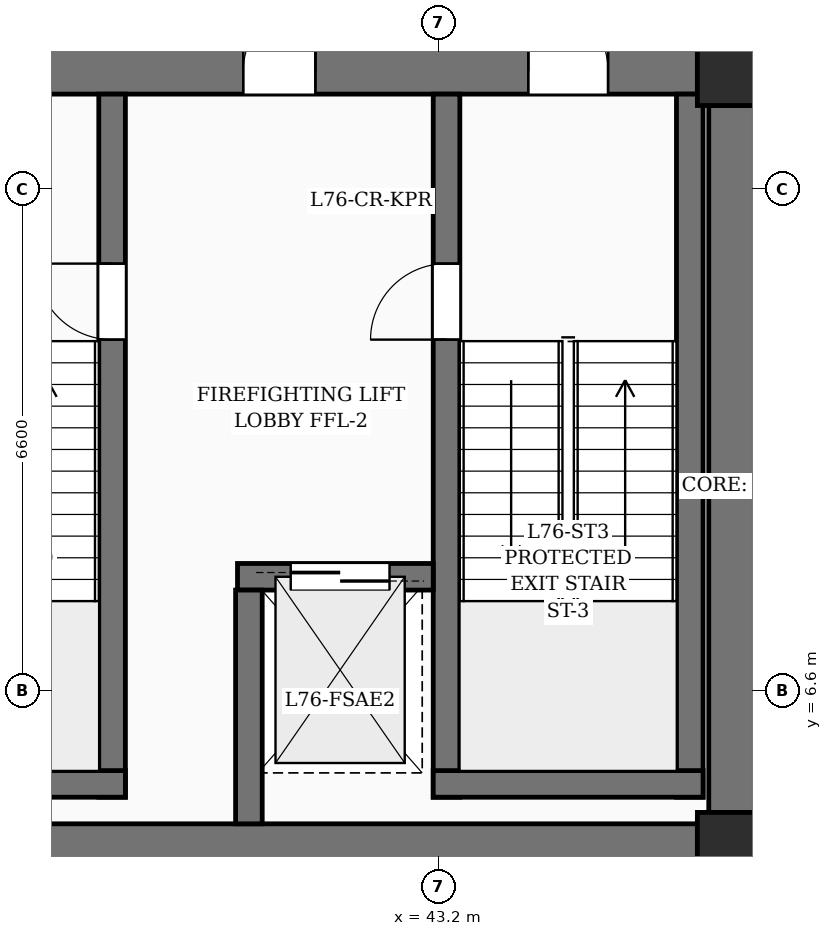
"""IFC4 building model, lengths in metres.
Left out: names, types, materials, properties, quantities, classifications, styles, units other than length and angle.
Written with IfcOpenShell. Run it as: python <this file> out.ifc"""

import sys

from ifc_helpers import new_model, si_unit, direction, frame, frame_2d, origin, origin_2d, place, context, subcontext, project, spatial, rectangle, extrude, element, fill, save


model = new_model("IFC4")
c1 = context("Model", 3, precision=1e-05, world=origin(), true_north=direction((0.0, 1.0)))
c2 = subcontext(c1, "Body", "Model", "MODEL_VIEW")
j1 = project(units=[si_unit("LENGTHUNIT", "METRE"), si_unit("PLANEANGLEUNIT", "RADIAN")], contexts=[c1])
p1 = place(None, origin())
s1 = spatial("IfcSite", under=j1, at=p1, CompositionType="ELEMENT")
p2 = place(p1, origin())
s2 = spatial("IfcBuilding", under=s1, at=p2, CompositionType="ELEMENT")
p3 = place(p2, frame((0.0, 0.0, 294.0)))
s3 = spatial("IfcBuildingStorey", under=s2, at=p3, CompositionType="ELEMENT", Elevation=294.0)
for number, where, z_axis, x_axis in (
    (1, (47.05, 4.55, 0.0), (0.0, 0.0, 1.0), (1.0, 0.0, 0.0)),
    (2, (47.05, 14.75, 0.0), (0.0, 0.0, 1.0), (1.0, 0.0, 0.0)),
):
    element("IfcColumn", number, at=place(p3, frame(where, z_axis=z_axis, x_axis=x_axis)), inside=s3, PredefinedType="COLUMN", context=c2, shape_type="SweptSolid", body=[
        extrude(rectangle(XDim=0.9, YDim=0.9, at=origin_2d()), origin(), (0.0, 0.0, 1.0), 4.5),
    ])
p4 = place(p3, frame((35.6, 4.55, 0.0), z_axis=(0.0, 0.0, 1.0), x_axis=(1.0, 0.0, 0.0)))
e3 = element("IfcWall", 3, at=p4, inside=s3, PredefinedType="SHEAR", context=c2, shape_type="SweptSolid", body=[
    extrude(rectangle(XDim=11.0, YDim=0.6, at=frame_2d((5.5, 0.0))), origin(), (0.0, 0.0, 1.0), 4.5),
])
p5 = place(p3, frame((35.6, 14.75, 0.0), z_axis=(0.0, 0.0, 1.0), x_axis=(1.0, 0.0, 0.0)))
e4 = element("IfcWall", 4, at=p5, inside=s3, PredefinedType="SHEAR", context=c2, shape_type="SweptSolid", body=[
    extrude(rectangle(XDim=11.0, YDim=0.6, at=frame_2d((5.5, 0.0))), origin(), (0.0, 0.0, 1.0), 4.5),
])
p6 = place(p5, frame((1.175, 0.0, 0.0)))
e5 = element("IfcOpeningElement", 5, at=p6, cuts=e4, PredefinedType="OPENING", context=c2, shape_type="SweptSolid", body=[
    extrude(rectangle(XDim=1.05, YDim=2.15, at=frame_2d((0.525, 1.075))), frame((0.0, 0.31, 0.0), z_axis=(0.0, -1.0, 0.0), x_axis=(1.0, 0.0, 0.0)), (0.0, 0.0, 1.0), 0.62),
])
p7 = place(p5, frame((8.775, 0.0, 0.0)))
e6 = element("IfcOpeningElement", 6, at=p7, cuts=e4, PredefinedType="OPENING", context=c2, shape_type="SweptSolid", body=[
    extrude(rectangle(XDim=1.05, YDim=2.15, at=frame_2d((0.525, 1.075))), frame((0.0, 0.31, 0.0), z_axis=(0.0, -1.0, 0.0), x_axis=(1.0, 0.0, 0.0)), (0.0, 0.0, 1.0), 0.62),
])
p8 = place(p5, frame((5.025, 0.0, 0.0)))
e7 = element("IfcOpeningElement", 7, at=p8, cuts=e4, PredefinedType="OPENING", context=c2, shape_type="SweptSolid", body=[
    extrude(rectangle(XDim=0.95, YDim=2.15, at=frame_2d((0.475, 1.075))), frame((0.0, 0.31, 0.0), z_axis=(0.0, -1.0, 0.0), x_axis=(1.0, 0.0, 0.0)), (0.0, 0.0, 1.0), 0.62),
])
p9 = place(p3, frame((47.05, 5.0, 0.0), z_axis=(0.0, 0.0, 1.0), x_axis=(0.0, 1.0, 0.0)))
e8 = element("IfcWall", 8, at=p9, inside=s3, PredefinedType="SHEAR", context=c2, shape_type="SweptSolid", body=[
    extrude(rectangle(XDim=9.3, YDim=0.6, at=frame_2d((4.65, 0.0))), origin(), (0.0, 0.0, 1.0), 4.5),
])
p10 = place(p3, frame((38.9, 5.2, 0.0), z_axis=(0.0, 0.0, 1.0), x_axis=(0.0, 1.0, 0.0)))
e9 = element("IfcWall", 9, at=p10, inside=s3, PredefinedType="SOLIDWALL", context=c2, shape_type="SweptSolid", body=[
    extrude(rectangle(XDim=9.25, YDim=0.35, at=frame_2d((4.625, 0.0))), origin(), (0.0, 0.0, 1.0), 4.5),
])
p11 = place(p10, frame((6.02, 0.0, 0.0)))
e10 = element("IfcOpeningElement", 10, at=p11, cuts=e9, PredefinedType="OPENING", context=c2, shape_type="SweptSolid", body=[
    extrude(rectangle(XDim=1.0, YDim=2.15, at=frame_2d((0.5, 1.075))), frame((0.0, 0.185, 0.0), z_axis=(0.0, -1.0, 0.0), x_axis=(1.0, 0.0, 0.0)), (0.0, 0.0, 1.0), 0.37),
])
p12 = place(p3, frame((35.525, 5.375, 0.0), z_axis=(0.0, 0.0, 1.0), x_axis=(1.0, 0.0, 0.0)))
e11 = element("IfcWall", 11, at=p12, inside=s3, PredefinedType="SOLIDWALL", context=c2, shape_type="SweptSolid", body=[
    extrude(rectangle(XDim=3.55, YDim=0.35, at=frame_2d((1.775, 0.0))), origin(), (0.0, 0.0, 1.0), 4.5),
])
p13 = place(p3, frame((43.3, 5.2, 0.0), z_axis=(0.0, 0.0, 1.0), x_axis=(0.0, 1.0, 0.0)))
e12 = element("IfcWall", 12, at=p13, inside=s3, PredefinedType="SOLIDWALL", context=c2, shape_type="SweptSolid", body=[
    extrude(rectangle(XDim=9.25, YDim=0.35, at=frame_2d((4.625, 0.0))), origin(), (0.0, 0.0, 1.0), 4.5),
])
p14 = place(p13, frame((6.02, 0.0, 0.0)))
e13 = element("IfcOpeningElement", 13, at=p14, cuts=e12, PredefinedType="OPENING", context=c2, shape_type="SweptSolid", body=[
    extrude(rectangle(XDim=1.0, YDim=2.15, at=frame_2d((0.5, 1.075))), frame((0.0, 0.185, 0.0), z_axis=(0.0, -1.0, 0.0), x_axis=(1.0, 0.0, 0.0)), (0.0, 0.0, 1.0), 0.37),
])
p15 = place(p3, frame((46.5, 5.2, 0.0), z_axis=(0.0, 0.0, 1.0), x_axis=(0.0, 1.0, 0.0)))
e14 = element("IfcWall", 14, at=p15, inside=s3, PredefinedType="SOLIDWALL", context=c2, shape_type="SweptSolid", body=[
    extrude(rectangle(XDim=9.25, YDim=0.35, at=frame_2d((4.625, 0.0))), origin(), (0.0, 0.0, 1.0), 4.5),
])
p16 = place(p3, frame((43.125, 5.375, 0.0), z_axis=(0.0, 0.0, 1.0), x_axis=(1.0, 0.0, 0.0)))
e15 = element("IfcWall", 15, at=p16, inside=s3, PredefinedType="SOLIDWALL", context=c2, shape_type="SweptSolid", body=[
    extrude(rectangle(XDim=3.55, YDim=0.35, at=frame_2d((1.775, 0.0))), origin(), (0.0, 0.0, 1.0), 4.5),
])
p17 = place(p3, frame((40.55, 8.1, 0.0), z_axis=(0.0, 0.0, 1.0), x_axis=(1.0, 0.0, 0.0)))
e16 = element("IfcWall", 16, at=p17, inside=s3, PredefinedType="SOLIDWALL", context=c2, shape_type="SweptSolid", body=[
    extrude(rectangle(XDim=2.575, YDim=0.35, at=frame_2d((1.288, 0.0))), origin(), (0.0, 0.0, 1.0), 4.5),
])
p18 = place(p17, frame((0.7, 0.0, 0.0)))
e17 = element("IfcOpeningElement", 17, at=p18, cuts=e16, PredefinedType="OPENING", context=c2, shape_type="SweptSolid", body=[
    extrude(rectangle(XDim=1.3, YDim=2.25, at=frame_2d((0.65, 1.125))), frame((0.0, 0.185, 0.0), z_axis=(0.0, -1.0, 0.0), x_axis=(1.0, 0.0, 0.0)), (0.0, 0.0, 1.0), 0.37),
])
p19 = place(p3, frame((40.7, 4.85, 0.0), z_axis=(0.0, 0.0, 1.0), x_axis=(0.0, 1.0, 0.0)))
e18 = element("IfcWall", 18, at=p19, inside=s3, PredefinedType="SOLIDWALL", context=c2, shape_type="SweptSolid", body=[
    extrude(rectangle(XDim=3.075, YDim=0.35, at=frame_2d((1.538, 0.0))), origin(), (0.0, 0.0, 1.0), 4.5),
])
p20 = place(p7, origin())
e19 = element("IfcDoor", 19, at=p20, inside=s3, OperationType="SINGLE_SWING_LEFT", PredefinedType="DOOR", context=c2, shape_type="SweptSolid", body=[
    extrude(rectangle(XDim=1.05, YDim=2.15, at=frame_2d((0.525, 1.075))), frame((0.0, 0.025, 0.0), z_axis=(0.0, -1.0, 0.0), x_axis=(1.0, 0.0, 0.0)), (0.0, 0.0, 1.0), 0.05),
])
fill(e6, e19)
p21 = place(p11, origin())
e20 = element("IfcDoor", 20, at=p21, inside=s3, OperationType="SINGLE_SWING_RIGHT", PredefinedType="DOOR", context=c2, shape_type="SweptSolid", body=[
    extrude(rectangle(XDim=1.0, YDim=2.15, at=frame_2d((0.5, 1.075))), frame((0.0, 0.025, 0.0), z_axis=(0.0, -1.0, 0.0), x_axis=(1.0, 0.0, 0.0)), (0.0, 0.0, 1.0), 0.05),
])
fill(e10, e20)
p22 = place(p14, origin())
e21 = element("IfcDoor", 21, at=p22, inside=s3, OperationType="SINGLE_SWING_LEFT", PredefinedType="DOOR", context=c2, shape_type="SweptSolid", body=[
    extrude(rectangle(XDim=1.0, YDim=2.15, at=frame_2d((0.5, 1.075))), frame((0.0, 0.025, 0.0), z_axis=(0.0, -1.0, 0.0), x_axis=(1.0, 0.0, 0.0)), (0.0, 0.0, 1.0), 0.05),
])
fill(e13, e21)
p23 = place(p18, origin())
e22 = element("IfcDoor", 22, at=p23, inside=s3, OperationType="DOUBLE_DOOR_SLIDING", PredefinedType="DOOR", context=c2, shape_type="SweptSolid", body=[
    extrude(rectangle(XDim=1.3, YDim=2.25, at=frame_2d((0.65, 1.125))), frame((0.0, 0.025, 0.0), z_axis=(0.0, -1.0, 0.0), x_axis=(1.0, 0.0, 0.0)), (0.0, 0.0, 1.0), 0.05),
])
fill(e17, e22)
p24 = place(p8, origin())
e23 = element("IfcDoor", 23, at=p24, inside=s3, OperationType="SINGLE_SWING_RIGHT", PredefinedType="DOOR", context=c2, shape_type="SweptSolid", body=[
    extrude(rectangle(XDim=0.95, YDim=2.15, at=frame_2d((0.475, 1.075))), frame((0.0, 0.025, 0.0), z_axis=(0.0, -1.0, 0.0), x_axis=(1.0, 0.0, 0.0)), (0.0, 0.0, 1.0), 0.05),
])
fill(e7, e23)
save(model, sys.argv[1])
